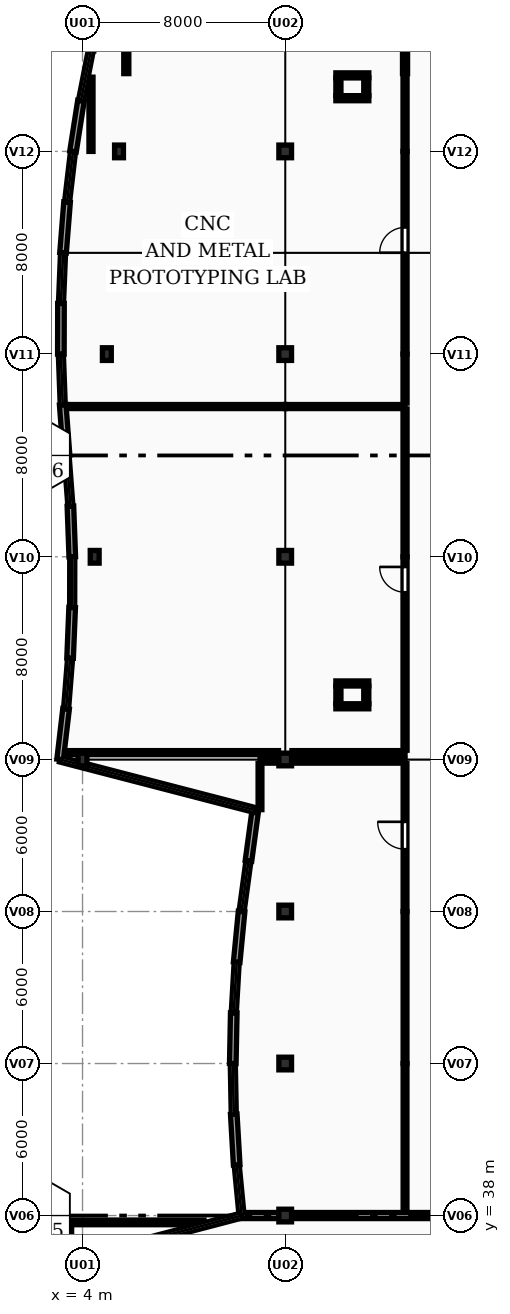
"""IFC4 building model, lengths in metres.
Left out: names, types, materials, properties, quantities, classifications, styles, units other than length and angle.
Written with IfcOpenShell. Run it as: python <this file> out.ifc"""

import sys

from ifc_helpers import new_model, si_unit, direction, frame, frame_2d, origin, origin_2d, place, context, subcontext, project, spatial, rectangle, extrude, element, fill, save


model = new_model("IFC4")
c1 = context("Model", 3, precision=1e-05, world=origin(), true_north=direction((0.0, 1.0)))
c2 = subcontext(c1, "Body", "Model", "MODEL_VIEW")
j1 = project(units=[si_unit("LENGTHUNIT", "METRE"), si_unit("PLANEANGLEUNIT", "RADIAN")], contexts=[c1])
p1 = place(None, origin())
s1 = spatial("IfcSite", under=j1, at=p1, CompositionType="ELEMENT")
p2 = place(p1, origin())
s2 = spatial("IfcBuilding", under=s1, at=p2, CompositionType="ELEMENT")
p3 = place(p2, origin())
s3 = spatial("IfcBuildingStorey", under=s2, at=p3, CompositionType="ELEMENT", Elevation=0.0)
for number, where, z_axis, x_axis in (
    (1, (4.0, 56.0, -0.2), (0.0, 0.0, 1.0), (1.0, 0.0, 0.0)),
    (2, (4.48, 64.0, -0.2), (0.0, 0.0, 1.0), (1.0, 0.0, 0.0)),
    (3, (4.96, 72.0, -0.2), (0.0, 0.0, 1.0), (1.0, 0.0, 0.0)),
    (4, (5.44, 80.0, -0.2), (0.0, 0.0, 1.0), (1.0, 0.0, 0.0)),
):
    element("IfcColumn", number, at=place(p3, frame(where, z_axis=z_axis, x_axis=x_axis)), inside=s3, PredefinedType="PILASTER", context=c2, shape_type="SweptSolid", body=[
        extrude(rectangle(XDim=0.35, YDim=0.5, at=origin_2d()), origin(), (0.0, 0.0, 1.0), 4.7),
    ])
for number, where, z_axis, x_axis in (
    (5, (12.0, 38.0, -0.2), (0.0, 0.0, 1.0), (1.0, 0.0, 0.0)),
    (6, (12.0, 44.0, -0.2), (0.0, 0.0, 1.0), (1.0, 0.0, 0.0)),
    (7, (12.0, 50.0, -0.2), (0.0, 0.0, 1.0), (1.0, 0.0, 0.0)),
    (8, (12.0, 56.0, -0.2), (0.0, 0.0, 1.0), (1.0, 0.0, 0.0)),
    (9, (12.0, 64.0, -0.2), (0.0, 0.0, 1.0), (1.0, 0.0, 0.0)),
    (10, (12.0, 72.0, -0.2), (0.0, 0.0, 1.0), (1.0, 0.0, 0.0)),
    (11, (12.0, 80.0, -0.2), (0.0, 0.0, 1.0), (1.0, 0.0, 0.0)),
):
    element("IfcColumn", number, at=place(p3, frame(where, z_axis=z_axis, x_axis=x_axis)), inside=s3, PredefinedType="COLUMN", context=c2, shape_type="SweptSolid", body=[
        extrude(rectangle(XDim=0.5, YDim=0.5, at=origin_2d()), origin(), (0.0, 0.0, 1.0), 4.7),
    ])
p4 = place(p3, frame((10.278, 38.0, 0.0), z_axis=(0.0, 0.0, 1.0), x_axis=(-0.09623099978, 0.99535902803, 0.0)))
e12 = element("IfcWall", 12, at=p4, inside=s3, PredefinedType="SOLIDWALL", context=c2, shape_type="SweptSolid", body=[
    extrude(rectangle(XDim=2.009, YDim=0.2, at=frame_2d((1.005, 0.0))), origin(), (0.0, 0.0, 1.0), 0.95),
])
p5 = place(p3, frame((10.085, 40.0, 0.0), z_axis=(0.0, 0.0, 1.0), x_axis=(-0.057643251596, 0.998337245396, 0.0)))
e13 = element("IfcWall", 13, at=p5, inside=s3, PredefinedType="SOLIDWALL", context=c2, shape_type="SweptSolid", body=[
    extrude(rectangle(XDim=2.003, YDim=0.26, at=frame_2d((1.002, 0.0))), origin(), (0.0, 0.0, 1.0), 4.24),
])
p6 = place(p3, frame((9.969, 42.0, 0.0), z_axis=(0.0, 0.0, 1.0), x_axis=(-0.019283523045, 0.999814055582, 0.0)))
e14 = element("IfcWall", 14, at=p6, inside=s3, PredefinedType="SOLIDWALL", context=c2, shape_type="SweptSolid", body=[
    extrude(rectangle(XDim=2.0, YDim=0.2, at=frame_2d((1.0, 0.0))), origin(), (0.0, 0.0, 1.0), 0.95),
])
p7 = place(p3, frame((9.931, 44.0, 0.0), z_axis=(0.0, 0.0, 1.0), x_axis=(0.019283523045, 0.999814055582, 0.0)))
e15 = element("IfcWall", 15, at=p7, inside=s3, PredefinedType="SOLIDWALL", context=c2, shape_type="SweptSolid", body=[
    extrude(rectangle(XDim=2.0, YDim=0.26, at=frame_2d((1.0, 0.0))), origin(), (0.0, 0.0, 1.0), 4.24),
])
p8 = place(p3, frame((9.969, 46.0, 0.0), z_axis=(0.0, 0.0, 1.0), x_axis=(0.057643251596, 0.998337245396, 0.0)))
e16 = element("IfcWall", 16, at=p8, inside=s3, PredefinedType="SOLIDWALL", context=c2, shape_type="SweptSolid", body=[
    extrude(rectangle(XDim=2.003, YDim=0.2, at=frame_2d((1.002, 0.0))), origin(), (0.0, 0.0, 1.0), 0.95),
])
p9 = place(p3, frame((10.085, 48.0, 0.0), z_axis=(0.0, 0.0, 1.0), x_axis=(0.09623099978, 0.99535902803, 0.0)))
e17 = element("IfcWall", 17, at=p9, inside=s3, PredefinedType="SOLIDWALL", context=c2, shape_type="SweptSolid", body=[
    extrude(rectangle(XDim=2.009, YDim=0.26, at=frame_2d((1.005, 0.0))), origin(), (0.0, 0.0, 1.0), 4.24),
])
p10 = place(p3, frame((10.278, 50.0, 0.0), z_axis=(0.0, 0.0, 1.0), x_axis=(0.134627389588, 0.990896294257, 0.0)))
e18 = element("IfcWall", 18, at=p10, inside=s3, PredefinedType="SOLIDWALL", context=c2, shape_type="SweptSolid", body=[
    extrude(rectangle(XDim=2.018, YDim=0.2, at=frame_2d((1.009, 0.0))), origin(), (0.0, 0.0, 1.0), 0.95),
])
p11 = place(p3, frame((10.55, 52.0, 0.0), z_axis=(0.0, 0.0, 1.0), x_axis=(0.134627389588, 0.990896294257, 0.0)))
e19 = element("IfcWall", 19, at=p11, inside=s3, PredefinedType="SOLIDWALL", context=c2, shape_type="SweptSolid", body=[
    extrude(rectangle(XDim=2.018, YDim=0.26, at=frame_2d((1.009, 0.0))), origin(), (0.0, 0.0, 1.0), 4.24),
])
p12 = place(p3, frame((10.822, 54.0, 0.0), z_axis=(0.0, 0.0, 1.0), x_axis=(-0.967937555254, 0.251190941573, 0.0)))
e20 = element("IfcWall", 20, at=p12, inside=s3, PredefinedType="SOLIDWALL", context=c2, shape_type="SweptSolid", body=[
    extrude(rectangle(XDim=7.962, YDim=0.2, at=frame_2d((3.981, 0.0))), origin(), (0.0, 0.0, 1.0), 0.95),
])
p13 = place(p3, frame((3.115, 56.0, 0.0), z_axis=(0.0, 0.0, 1.0), x_axis=(0.116988959085, 0.99313321536, 0.0)))
e21 = element("IfcWall", 21, at=p13, inside=s3, PredefinedType="SOLIDWALL", context=c2, shape_type="SweptSolid", body=[
    extrude(rectangle(XDim=2.014, YDim=0.26, at=frame_2d((1.007, 0.0))), origin(), (0.0, 0.0, 1.0), 4.24),
])
p14 = place(p3, frame((3.351, 58.0, 0.0), z_axis=(0.0, 0.0, 1.0), x_axis=(0.078976178075, 0.996876503533, 0.0)))
e22 = element("IfcWall", 22, at=p14, inside=s3, PredefinedType="SOLIDWALL", context=c2, shape_type="SweptSolid", body=[
    extrude(rectangle(XDim=2.006, YDim=0.2, at=frame_2d((1.003, 0.0))), origin(), (0.0, 0.0, 1.0), 0.95),
])
p15 = place(p3, frame((3.509, 60.0, 0.0), z_axis=(0.0, 0.0, 1.0), x_axis=(0.040737639062, 0.99916987783, 0.0)))
e23 = element("IfcWall", 23, at=p15, inside=s3, PredefinedType="SOLIDWALL", context=c2, shape_type="SweptSolid", body=[
    extrude(rectangle(XDim=2.002, YDim=0.26, at=frame_2d((1.001, 0.0))), origin(), (0.0, 0.0, 1.0), 4.24),
])
p16 = place(p3, frame((3.591, 62.0, 0.0), z_axis=(0.0, 0.0, 1.0), x_axis=(0.002197260321, 0.999997586021, 0.0)))
e24 = element("IfcWall", 24, at=p16, inside=s3, PredefinedType="SOLIDWALL", context=c2, shape_type="SweptSolid", body=[
    extrude(rectangle(XDim=2.0, YDim=0.2, at=frame_2d((1.0, 0.0))), origin(), (0.0, 0.0, 1.0), 0.95),
])
p17 = place(p3, frame((3.595, 64.0, 0.0), z_axis=(0.0, 0.0, 1.0), x_axis=(-0.036596562065, 0.999330121454, 0.0)))
e25 = element("IfcWall", 25, at=p17, inside=s3, PredefinedType="SOLIDWALL", context=c2, shape_type="SweptSolid", body=[
    extrude(rectangle(XDim=2.001, YDim=0.26, at=frame_2d((1.0, 0.0))), origin(), (0.0, 0.0, 1.0), 4.24),
])
p18 = place(p3, frame((3.522, 66.0, 0.0), z_axis=(0.0, 0.0, 1.0), x_axis=(-0.075588789742, 0.997139074987, 0.0)))
e26 = element("IfcWall", 26, at=p18, inside=s3, PredefinedType="SOLIDWALL", context=c2, shape_type="SweptSolid", body=[
    extrude(rectangle(XDim=2.006, YDim=0.2, at=frame_2d((1.003, 0.0))), origin(), (0.0, 0.0, 1.0), 0.95),
])
p19 = place(p3, frame((3.37, 68.0, 0.0), z_axis=(0.0, 0.0, 1.0), x_axis=(-0.075709813676, 0.9971298933, 0.0)))
e27 = element("IfcWall", 27, at=p19, inside=s3, PredefinedType="SOLIDWALL", context=c2, shape_type="SweptSolid", body=[
    extrude(rectangle(XDim=2.006, YDim=0.26, at=frame_2d((1.003, 0.0))), origin(), (0.0, 0.0, 1.0), 4.24),
])
p20 = place(p3, frame((3.218, 70.0, 0.0), z_axis=(0.0, 0.0, 1.0), x_axis=(-0.036596562065, 0.999330121454, 0.0)))
e28 = element("IfcWall", 28, at=p20, inside=s3, PredefinedType="SOLIDWALL", context=c2, shape_type="SweptSolid", body=[
    extrude(rectangle(XDim=2.001, YDim=0.2, at=frame_2d((1.0, 0.0))), origin(), (0.0, 0.0, 1.0), 0.95),
])
p21 = place(p3, frame((3.145, 72.0, 0.0), z_axis=(0.0, 0.0, 1.0), x_axis=(0.002197260321, 0.999997586021, 0.0)))
e29 = element("IfcWall", 29, at=p21, inside=s3, PredefinedType="SOLIDWALL", context=c2, shape_type="SweptSolid", body=[
    extrude(rectangle(XDim=2.0, YDim=0.26, at=frame_2d((1.0, 0.0))), origin(), (0.0, 0.0, 1.0), 4.24),
])
p22 = place(p3, frame((3.149, 74.0, 0.0), z_axis=(0.0, 0.0, 1.0), x_axis=(0.040737639062, 0.99916987783, 0.0)))
e30 = element("IfcWall", 30, at=p22, inside=s3, PredefinedType="SOLIDWALL", context=c2, shape_type="SweptSolid", body=[
    extrude(rectangle(XDim=2.002, YDim=0.2, at=frame_2d((1.001, 0.0))), origin(), (0.0, 0.0, 1.0), 0.95),
])
p23 = place(p3, frame((3.231, 76.0, 0.0), z_axis=(0.0, 0.0, 1.0), x_axis=(0.078976178075, 0.996876503533, 0.0)))
e31 = element("IfcWall", 31, at=p23, inside=s3, PredefinedType="SOLIDWALL", context=c2, shape_type="SweptSolid", body=[
    extrude(rectangle(XDim=2.006, YDim=0.26, at=frame_2d((1.003, 0.0))), origin(), (0.0, 0.0, 1.0), 4.24),
])
p24 = place(p3, frame((3.389, 78.0, 0.0), z_axis=(0.0, 0.0, 1.0), x_axis=(0.116988959085, 0.99313321536, 0.0)))
e32 = element("IfcWall", 32, at=p24, inside=s3, PredefinedType="SOLIDWALL", context=c2, shape_type="SweptSolid", body=[
    extrude(rectangle(XDim=2.014, YDim=0.2, at=frame_2d((1.007, 0.0))), origin(), (0.0, 0.0, 1.0), 0.95),
])
p25 = place(p3, frame((3.625, 80.0, 0.0), z_axis=(0.0, 0.0, 1.0), x_axis=(0.15473004848, 0.987956786554, 0.0)))
e33 = element("IfcWall", 33, at=p25, inside=s3, PredefinedType="SOLIDWALL", context=c2, shape_type="SweptSolid", body=[
    extrude(rectangle(XDim=2.024, YDim=0.26, at=frame_2d((1.012, 0.0))), origin(), (0.0, 0.0, 1.0), 4.24),
])
p26 = place(p3, frame((3.938, 82.0, 0.0), z_axis=(0.0, 0.0, 1.0), x_axis=(0.192267434085, 0.981342566992, 0.0)))
e34 = element("IfcWall", 34, at=p26, inside=s3, PredefinedType="SOLIDWALL", context=c2, shape_type="SweptSolid", body=[
    extrude(rectangle(XDim=2.038, YDim=0.2, at=frame_2d((1.019, 0.0))), origin(), (0.0, 0.0, 1.0), 0.95),
])
p27 = place(p3, frame((19.75, 38.0, 0.0), z_axis=(0.0, 0.0, 1.0), x_axis=(-1.0, 0.0, 0.0)))
e35 = element("IfcWall", 35, at=p27, inside=s3, PredefinedType="SOLIDWALL", context=c2, shape_type="SweptSolid", body=[
    extrude(rectangle(XDim=7.5, YDim=0.24, at=frame_2d((3.75, 0.0))), origin(), (0.0, 0.0, 1.0), 3.59),
])
p28 = place(p3, frame((11.75, 38.0, 0.0), z_axis=(0.0, 0.0, 1.0), x_axis=(-1.0, 0.0, 0.0)))
e36 = element("IfcWall", 36, at=p28, inside=s3, PredefinedType="SOLIDWALL", context=c2, shape_type="SweptSolid", body=[
    extrude(rectangle(XDim=1.472, YDim=0.24, at=frame_2d((0.736, 0.0))), origin(), (0.0, 0.0, 1.0), 3.59),
])
p29 = place(p3, frame((2.65, 36.0, 0.0), z_axis=(0.0, 0.0, 1.0), x_axis=(0.967307517152, 0.253606323386, 0.0)))
e37 = element("IfcWall", 37, at=p29, inside=s3, PredefinedType="SOLIDWALL", context=c2, shape_type="SweptSolid", body=[
    extrude(rectangle(XDim=7.886, YDim=0.2, at=frame_2d((3.943, 0.0))), origin(), (0.0, 0.0, 1.0), 0.95),
])
for number, where, z_axis, x_axis in (
    (38, (15.3, 58.1, 0.0), (0.0, 0.0, 1.0), (-1.0, 0.0, 0.0)),
    (39, (14.0, 59.0, 0.0), (0.0, 0.0, 1.0), (1.0, 0.0, 0.0)),
):
    element("IfcWall", number, at=place(p3, frame(where, z_axis=z_axis, x_axis=x_axis)), inside=s3, PredefinedType="PARTITIONING", context=c2, shape_type="SweptSolid", body=[
        extrude(rectangle(XDim=1.3, YDim=0.2, at=frame_2d((0.65, 0.0))), origin(), (0.0, 0.0, 1.0), 4.24),
    ])
for number, where, z_axis, x_axis in (
    (40, (14.1, 58.2, 0.0), (0.0, 0.0, 1.0), (0.0, 1.0, 0.0)),
    (41, (15.2, 58.9, 0.0), (0.0, 0.0, 1.0), (0.0, -1.0, 0.0)),
):
    element("IfcWall", number, at=place(p3, frame(where, z_axis=z_axis, x_axis=x_axis)), inside=s3, PredefinedType="PARTITIONING", context=c2, shape_type="SweptSolid", body=[
        extrude(rectangle(XDim=0.7, YDim=0.2, at=frame_2d((0.35, 0.0))), origin(), (0.0, 0.0, 1.0), 4.24),
    ])
for number, where, z_axis, x_axis in (
    (42, (15.3, 82.1, 0.0), (0.0, 0.0, 1.0), (-1.0, 0.0, 0.0)),
    (43, (14.0, 83.0, 0.0), (0.0, 0.0, 1.0), (1.0, 0.0, 0.0)),
):
    element("IfcWall", number, at=place(p3, frame(where, z_axis=z_axis, x_axis=x_axis)), inside=s3, PredefinedType="PARTITIONING", context=c2, shape_type="SweptSolid", body=[
        extrude(rectangle(XDim=1.3, YDim=0.2, at=frame_2d((0.65, 0.0))), origin(), (0.0, 0.0, 1.0), 4.24),
    ])
for number, where, z_axis, x_axis in (
    (44, (14.1, 82.2, 0.0), (0.0, 0.0, 1.0), (0.0, 1.0, 0.0)),
    (45, (15.2, 82.9, 0.0), (0.0, 0.0, 1.0), (0.0, -1.0, 0.0)),
):
    element("IfcWall", number, at=place(p3, frame(where, z_axis=z_axis, x_axis=x_axis)), inside=s3, PredefinedType="PARTITIONING", context=c2, shape_type="SweptSolid", body=[
        extrude(rectangle(XDim=0.7, YDim=0.2, at=frame_2d((0.35, 0.0))), origin(), (0.0, 0.0, 1.0), 4.24),
    ])
p30 = place(p3, frame((3.319, 56.27, 0.0), z_axis=(0.0, 0.0, 1.0), x_axis=(1.0, 0.0, 0.0)))
e46 = element("IfcWall", 46, at=p30, inside=s3, PredefinedType="PARTITIONING", context=c2, shape_type="SweptSolid", body=[
    extrude(rectangle(XDim=8.416, YDim=0.16, at=frame_2d((4.208, 0.0))), origin(), (0.0, 0.0, 1.0), 3.59),
])
p31 = place(p3, frame((12.265, 56.27, 0.0), z_axis=(0.0, 0.0, 1.0), x_axis=(1.0, 0.0, 0.0)))
e47 = element("IfcWall", 47, at=p31, inside=s3, PredefinedType="PARTITIONING", context=c2, shape_type="SweptSolid", body=[
    extrude(rectangle(XDim=4.465, YDim=0.16, at=frame_2d((2.232, 0.0))), origin(), (0.0, 0.0, 1.0), 3.59),
])
p32 = place(p3, frame((3.396, 69.93, 0.0), z_axis=(0.0, 0.0, 1.0), x_axis=(1.0, 0.0, 0.0)))
e48 = element("IfcWall", 48, at=p32, inside=s3, PredefinedType="PARTITIONING", context=c2, shape_type="SweptSolid", body=[
    extrude(rectangle(XDim=8.604, YDim=0.16, at=frame_2d((4.302, 0.0))), origin(), (0.0, 0.0, 1.0), 4.24),
])
p33 = place(p3, frame((12.0, 69.93, 0.0), z_axis=(0.0, 0.0, 1.0), x_axis=(1.0, 0.0, 0.0)))
e49 = element("IfcWall", 49, at=p33, inside=s3, PredefinedType="PARTITIONING", context=c2, shape_type="SweptSolid", body=[
    extrude(rectangle(XDim=4.73, YDim=0.16, at=frame_2d((2.365, 0.0))), origin(), (0.0, 0.0, 1.0), 4.24),
])
p34 = place(p3, frame((16.73, 56.365, 0.0), z_axis=(0.0, 0.0, 1.0), x_axis=(0.0, 1.0, 0.0)))
e50 = element("IfcWall", 50, at=p34, inside=s3, PredefinedType="PARTITIONING", context=c2, shape_type="SweptSolid", body=[
    extrude(rectangle(XDim=7.635, YDim=0.16, at=frame_2d((3.817, 0.0))), origin(), (0.0, 0.0, 1.0), 4.24),
])
p35 = place(p34, frame((6.235, 0.0, 0.0)))
e51 = element("IfcOpeningElement", 51, at=p35, cuts=e50, PredefinedType="OPENING", context=c2, shape_type="SweptSolid", body=[
    extrude(rectangle(XDim=1.0, YDim=2.15, at=frame_2d((0.5, 1.075))), frame((0.0, 0.09, 0.0), z_axis=(0.0, -1.0, 0.0), x_axis=(1.0, 0.0, 0.0)), (0.0, 0.0, 1.0), 0.18),
])
p36 = place(p3, frame((16.73, 64.0, 0.0), z_axis=(0.0, 0.0, 1.0), x_axis=(0.0, 1.0, 0.0)))
e52 = element("IfcWall", 52, at=p36, inside=s3, PredefinedType="PARTITIONING", context=c2, shape_type="SweptSolid", body=[
    extrude(rectangle(XDim=5.835, YDim=0.16, at=frame_2d((2.917, 0.0))), origin(), (0.0, 0.0, 1.0), 4.24),
])
p37 = place(p3, frame((4.334, 80.0, 0.0), z_axis=(0.0, 0.0, 1.0), x_axis=(0.0, 1.0, 0.0)))
e53 = element("IfcWall", 53, at=p37, inside=s3, PredefinedType="PARTITIONING", context=c2, shape_type="SweptSolid", body=[
    extrude(rectangle(XDim=2.93, YDim=0.16, at=frame_2d((1.465, 0.0))), origin(), (0.0, 0.0, 1.0), 4.24),
])
p38 = place(p3, frame((16.73, 70.07, 0.0), z_axis=(0.0, 0.0, 1.0), x_axis=(0.0, 1.0, 0.0)))
e54 = element("IfcWall", 54, at=p38, inside=s3, PredefinedType="PARTITIONING", context=c2, shape_type="SweptSolid", body=[
    extrude(rectangle(XDim=1.93, YDim=0.16, at=frame_2d((0.965, 0.0))), origin(), (0.0, 0.0, 1.0), 4.24),
])
p39 = place(p3, frame((16.73, 72.0, 0.0), z_axis=(0.0, 0.0, 1.0), x_axis=(0.0, 1.0, 0.0)))
e55 = element("IfcWall", 55, at=p39, inside=s3, PredefinedType="PARTITIONING", context=c2, shape_type="SweptSolid", body=[
    extrude(rectangle(XDim=8.0, YDim=0.16, at=frame_2d((4.0, 0.0))), origin(), (0.0, 0.0, 1.0), 4.24),
])
p40 = place(p39, frame((4.0, 0.0, 0.0)))
e56 = element("IfcOpeningElement", 56, at=p40, cuts=e55, PredefinedType="OPENING", context=c2, shape_type="SweptSolid", body=[
    extrude(rectangle(XDim=1.0, YDim=2.15, at=frame_2d((0.5, 1.075))), frame((0.0, 0.09, 0.0), z_axis=(0.0, -1.0, 0.0), x_axis=(1.0, 0.0, 0.0)), (0.0, 0.0, 1.0), 0.18),
])
p41 = place(p3, frame((16.73, 80.0, 0.0), z_axis=(0.0, 0.0, 1.0), x_axis=(0.0, 1.0, 0.0)))
e57 = element("IfcWall", 57, at=p41, inside=s3, PredefinedType="PARTITIONING", context=c2, shape_type="SweptSolid", body=[
    extrude(rectangle(XDim=2.93, YDim=0.16, at=frame_2d((1.465, 0.0))), origin(), (0.0, 0.0, 1.0), 4.24),
])
p42 = place(p3, frame((5.728, 83.07, 0.0), z_axis=(0.0, 0.0, 1.0), x_axis=(0.0, 1.0, 0.0)))
e58 = element("IfcWall", 58, at=p42, inside=s3, PredefinedType="PARTITIONING", context=c2, shape_type="SweptSolid", body=[
    extrude(rectangle(XDim=4.665, YDim=0.2, at=frame_2d((2.333, 0.0))), origin(), (0.0, 0.0, 1.0), 3.54),
])
p43 = place(p3, frame((16.73, 83.07, 0.0), z_axis=(0.0, 0.0, 1.0), x_axis=(0.0, 1.0, 0.0)))
e59 = element("IfcWall", 59, at=p43, inside=s3, PredefinedType="PARTITIONING", context=c2, shape_type="SweptSolid", body=[
    extrude(rectangle(XDim=4.93, YDim=0.2, at=frame_2d((2.465, 0.0))), origin(), (0.0, 0.0, 1.0), 4.24),
])
p44 = place(p3, frame((11.005, 55.93, 0.0), z_axis=(0.0, 0.0, 1.0), x_axis=(1.0, 0.0, 0.0)))
e60 = element("IfcWall", 60, at=p44, inside=s3, PredefinedType="PARTITIONING", context=c2, shape_type="SweptSolid", body=[
    extrude(rectangle(XDim=5.725, YDim=0.15, at=frame_2d((2.863, 0.0))), origin(), (0.0, 0.0, 1.0), 3.59),
])
p45 = place(p3, frame((11.005, 54.02, 0.0), z_axis=(0.0, 0.0, 1.0), x_axis=(0.0, 1.0, 0.0)))
e61 = element("IfcWall", 61, at=p45, inside=s3, PredefinedType="PARTITIONING", context=c2, shape_type="SweptSolid", body=[
    extrude(rectangle(XDim=1.82, YDim=0.15, at=frame_2d((0.91, 0.0))), origin(), (0.0, 0.0, 1.0), 4.24),
])
p46 = place(p3, frame((16.73, 38.162, 0.0), z_axis=(0.0, 0.0, 1.0), x_axis=(0.0, 1.0, 0.0)))
e62 = element("IfcWall", 62, at=p46, inside=s3, PredefinedType="PARTITIONING", context=c2, shape_type="SweptSolid", body=[
    extrude(rectangle(XDim=5.838, YDim=0.15, at=frame_2d((2.919, 0.0))), origin(), (0.0, 0.0, 1.0), 4.24),
])
p47 = place(p3, frame((16.73, 44.0, 0.0), z_axis=(0.0, 0.0, 1.0), x_axis=(0.0, 1.0, 0.0)))
e63 = element("IfcWall", 63, at=p47, inside=s3, PredefinedType="PARTITIONING", context=c2, shape_type="SweptSolid", body=[
    extrude(rectangle(XDim=6.0, YDim=0.15, at=frame_2d((3.0, 0.0))), origin(), (0.0, 0.0, 1.0), 4.24),
])
p48 = place(p3, frame((16.73, 50.0, 0.0), z_axis=(0.0, 0.0, 1.0), x_axis=(0.0, 1.0, 0.0)))
e64 = element("IfcWall", 64, at=p48, inside=s3, PredefinedType="PARTITIONING", context=c2, shape_type="SweptSolid", body=[
    extrude(rectangle(XDim=5.84, YDim=0.15, at=frame_2d((2.92, 0.0))), origin(), (0.0, 0.0, 1.0), 4.24),
])
p49 = place(p48, frame((2.46, 0.0, 0.0)))
e65 = element("IfcOpeningElement", 65, at=p49, cuts=e64, PredefinedType="OPENING", context=c2, shape_type="SweptSolid", body=[
    extrude(rectangle(XDim=1.08, YDim=2.15, at=frame_2d((0.54, 1.075))), frame((0.0, 0.085, 0.0), z_axis=(0.0, -1.0, 0.0), x_axis=(1.0, 0.0, 0.0)), (0.0, 0.0, 1.0), 0.17),
])
p50 = place(p3, frame((3.477, 37.73, 0.0), z_axis=(0.0, 0.0, 1.0), x_axis=(1.0, 0.0, 0.0)))
e66 = element("IfcWall", 66, at=p50, inside=s3, PredefinedType="PARTITIONING", context=c2, shape_type="SweptSolid", body=[
    extrude(rectangle(XDim=5.318, YDim=0.185, at=frame_2d((2.659, 0.0))), origin(), (0.0, 0.0, 1.0), 4.24),
])
p51 = place(p3, frame((3.477, 36.336, 0.0), z_axis=(0.0, 0.0, 1.0), x_axis=(0.0, 1.0, 0.0)))
e67 = element("IfcWall", 67, at=p51, inside=s3, PredefinedType="PARTITIONING", context=c2, shape_type="SweptSolid", body=[
    extrude(rectangle(XDim=1.287, YDim=0.185, at=frame_2d((0.644, 0.0))), origin(), (0.0, 0.0, 1.0), 4.24),
])
p52 = place(p35, origin())
e68 = element("IfcDoor", 68, at=p52, inside=s3, OperationType="SINGLE_SWING_RIGHT", PredefinedType="DOOR", context=c2, shape_type="SweptSolid", body=[
    extrude(rectangle(XDim=1.0, YDim=2.15, at=frame_2d((0.5, 1.075))), frame((0.0, 0.025, 0.0), z_axis=(0.0, -1.0, 0.0), x_axis=(1.0, 0.0, 0.0)), (0.0, 0.0, 1.0), 0.05),
])
fill(e51, e68)
p53 = place(p40, origin())
e69 = element("IfcDoor", 69, at=p53, inside=s3, OperationType="SINGLE_SWING_LEFT", PredefinedType="DOOR", context=c2, shape_type="SweptSolid", body=[
    extrude(rectangle(XDim=1.0, YDim=2.15, at=frame_2d((0.5, 1.075))), frame((0.0, 0.025, 0.0), z_axis=(0.0, -1.0, 0.0), x_axis=(1.0, 0.0, 0.0)), (0.0, 0.0, 1.0), 0.05),
])
fill(e56, e69)
p54 = place(p49, origin())
e70 = element("IfcDoor", 70, at=p54, inside=s3, OperationType="SINGLE_SWING_RIGHT", PredefinedType="DOOR", context=c2, shape_type="SweptSolid", body=[
    extrude(rectangle(XDim=1.08, YDim=2.15, at=frame_2d((0.54, 1.075))), frame((0.0, 0.025, 0.0), z_axis=(0.0, -1.0, 0.0), x_axis=(1.0, 0.0, 0.0)), (0.0, 0.0, 1.0), 0.05),
])
fill(e65, e70)
save(model, sys.argv[1])
